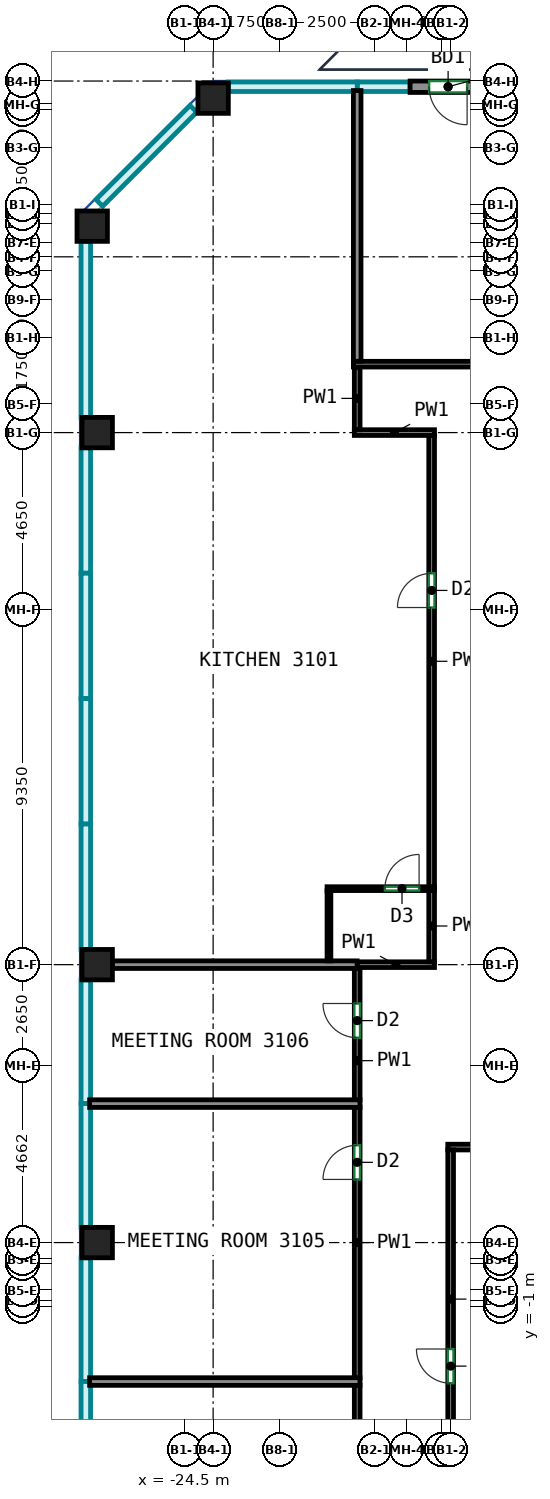
"""IFC4 building model, lengths in metres.
Left out: names, types, materials, properties, quantities, classifications, styles, units other than length and angle.
Written with IfcOpenShell. Run it as: python <this file> out.ifc"""

import sys

from ifc_helpers import new_model, si_unit, direction, frame, frame_2d, origin, origin_2d, place, context, subcontext, project, spatial, rectangle, extrude, source, transform, mapped, element, fill, save


model = new_model("IFC4")
c1 = context("Model", 3, precision=1e-05, world=origin(), true_north=direction((0.0, 1.0)))
c2 = subcontext(c1, "Body", "Model", "MODEL_VIEW")
j1 = project(units=[si_unit("LENGTHUNIT", "METRE"), si_unit("PLANEANGLEUNIT", "RADIAN")], contexts=[c1])
p1 = place(None, origin())
s1 = spatial("IfcSite", under=j1, at=p1, CompositionType="ELEMENT")
p2 = place(p1, origin())
s2 = spatial("IfcBuilding", under=s1, at=p2, CompositionType="ELEMENT")
p3 = place(p2, frame((0.0, 0.0, 138.5)))
s3 = spatial("IfcBuildingStorey", under=s2, at=p3, CompositionType="ELEMENT", Elevation=138.5)
m1 = source(origin(), c2, "Body", "SweptSolid", [
    extrude(rectangle(XDim=0.8, YDim=0.8, at=origin_2d()), origin(), (0.0, 0.0, 1.0), 5.12),
])
for number, where, z_axis, x_axis in (
    (1, (-26.932, 27.432, 0.0), (0.0, 0.0, 1.0), (1.0, 0.0, 0.0)),
    (2, (-26.8, 0.688, 0.0), (0.0, 0.0, 1.0), (1.0, 0.0, 0.0)),
    (3, (-26.8, 8.0, 0.0), (0.0, 0.0, 1.0), (1.0, 0.0, 0.0)),
    (4, (-26.8, 22.0, 0.0), (0.0, 0.0, 1.0), (1.0, 0.0, 0.0)),
    (5, (-23.75, 30.8, 0.0), (0.0, 0.0, 1.0), (1.0, 0.0, 0.0)),
):
    element("IfcColumn", number, at=place(p3, frame(where, z_axis=z_axis, x_axis=x_axis)), inside=s3, PredefinedType="COLUMN", context=c2, shape_type="MappedRepresentation", body=[
        mapped(m1, transform((0.0, 0.0, 0.0))),
    ])
m2 = source(origin(), c2, "Body", "SweptSolid", [
    extrude(rectangle(XDim=2.0, YDim=0.3, at=frame_2d((1.0, 0.0))), origin(), (0.0, 0.0, 1.0), 5.12),
])
p4 = place(p3, frame((-16.567, 31.1, 0.0), z_axis=(0.0, 0.0, 1.0), x_axis=(-1.0, 0.0, 0.0)))
e6 = element("IfcWall", 6, at=p4, inside=s3, PredefinedType="SOLIDWALL", context=c2, shape_type="MappedRepresentation", body=[
    mapped(m2, transform((0.0, 0.0, 0.0))),
])
p5 = place(p4, frame((0.5, 0.0, 0.0)))
e7 = element("IfcOpeningElement", 7, at=p5, cuts=e6, PredefinedType="OPENING", context=c2, shape_type="SweptSolid", body=[
    extrude(rectangle(XDim=1.0, YDim=2.1, at=frame_2d((0.5, 1.05))), frame((0.0, 0.16, 0.0), z_axis=(0.0, -1.0, 0.0), x_axis=(1.0, 0.0, 0.0)), (0.0, 0.0, 1.0), 0.32),
])
p6 = place(p3, frame((-19.959, -6.535, 0.0), z_axis=(0.0, 0.0, 1.0), x_axis=(0.0, 1.0, 0.0)))
e8 = element("IfcWall", 8, at=p6, inside=s3, PredefinedType="PARTITIONING", context=c2, shape_type="SweptSolid", body=[
    extrude(rectangle(XDim=3.476, YDim=0.15, at=frame_2d((1.738, 0.0))), origin(), (0.0, 0.0, 1.0), 5.12),
])
p7 = place(p6, frame((1.133, 0.0, 0.0)))
e9 = element("IfcOpeningElement", 9, at=p7, cuts=e8, PredefinedType="OPENING", context=c2, shape_type="SweptSolid", body=[
    extrude(rectangle(XDim=0.9, YDim=2.1, at=frame_2d((0.45, 1.05))), frame((0.0, 0.085, 0.0), z_axis=(0.0, -1.0, 0.0), x_axis=(1.0, 0.0, 0.0)), (0.0, 0.0, 1.0), 0.17),
])
p8 = place(p3, frame((-19.959, -2.879, 0.0), z_axis=(0.0, 0.0, 1.0), x_axis=(0.0, 1.0, 0.0)))
e10 = element("IfcWall", 10, at=p8, inside=s3, PredefinedType="PARTITIONING", context=c2, shape_type="SweptSolid", body=[
    extrude(rectangle(XDim=7.133, YDim=0.15, at=frame_2d((3.566, 0.0))), origin(), (0.0, 0.0, 1.0), 5.12),
])
p9 = place(p8, frame((5.228, 0.0, 0.0)))
e11 = element("IfcOpeningElement", 11, at=p9, cuts=e10, PredefinedType="OPENING", context=c2, shape_type="SweptSolid", body=[
    extrude(rectangle(XDim=0.9, YDim=2.1, at=frame_2d((0.45, 1.05))), frame((0.0, 0.085, 0.0), z_axis=(0.0, -1.0, 0.0), x_axis=(1.0, 0.0, 0.0)), (0.0, 0.0, 1.0), 0.17),
])
p10 = place(p3, frame((-19.959, 4.434, 0.0), z_axis=(0.0, 0.0, 1.0), x_axis=(0.0, 1.0, 0.0)))
e12 = element("IfcWall", 12, at=p10, inside=s3, PredefinedType="PARTITIONING", context=c2, shape_type="SweptSolid", body=[
    extrude(rectangle(XDim=3.466, YDim=0.15, at=frame_2d((1.733, 0.0))), origin(), (0.0, 0.0, 1.0), 5.12),
])
p11 = place(p10, frame((1.644, 0.0, 0.0)))
e13 = element("IfcOpeningElement", 13, at=p11, cuts=e12, PredefinedType="OPENING", context=c2, shape_type="SweptSolid", body=[
    extrude(rectangle(XDim=0.9, YDim=2.1, at=frame_2d((0.45, 1.05))), frame((0.0, 0.085, 0.0), z_axis=(0.0, -1.0, 0.0), x_axis=(1.0, 0.0, 0.0)), (0.0, 0.0, 1.0), 0.17),
])
p12 = place(p3, frame((-18.0, 10.04, 0.0), z_axis=(0.0, 0.0, 1.0), x_axis=(0.0, 1.0, 0.0)))
e14 = element("IfcWall", 14, at=p12, inside=s3, PredefinedType="PARTITIONING", context=c2, shape_type="SweptSolid", body=[
    extrude(rectangle(XDim=11.885, YDim=0.15, at=frame_2d((5.942, 0.0))), origin(), (0.0, 0.0, 1.0), 5.12),
])
p13 = place(p12, frame((7.357, 0.0, 0.0)))
e15 = element("IfcOpeningElement", 15, at=p13, cuts=e14, PredefinedType="OPENING", context=c2, shape_type="SweptSolid", body=[
    extrude(rectangle(XDim=0.9, YDim=2.1, at=frame_2d((0.45, 1.05))), frame((0.0, 0.085, 0.0), z_axis=(0.0, -1.0, 0.0), x_axis=(1.0, 0.0, 0.0)), (0.0, 0.0, 1.0), 0.17),
])
p14 = place(p3, frame((-20.034, 22.0, 0.0), z_axis=(0.0, 0.0, 1.0), x_axis=(1.0, 0.0, 0.0)))
e16 = element("IfcWall", 16, at=p14, inside=s3, PredefinedType="PARTITIONING", context=c2, shape_type="SweptSolid", body=[
    extrude(rectangle(XDim=2.109, YDim=0.15, at=frame_2d((1.054, 0.0))), origin(), (0.0, 0.0, 1.0), 5.12),
])
p15 = place(p3, frame((-19.959, 22.075, 0.0), z_axis=(0.0, 0.0, 1.0), x_axis=(0.0, 1.0, 0.0)))
e17 = element("IfcWall", 17, at=p15, inside=s3, PredefinedType="PARTITIONING", context=c2, shape_type="SweptSolid", body=[
    extrude(rectangle(XDim=1.65, YDim=0.15, at=frame_2d((0.825, 0.0))), origin(), (0.0, 0.0, 1.0), 5.12),
])
p16 = place(p3, frame((-17.925, 8.0, 0.0), z_axis=(0.0, 0.0, 1.0), x_axis=(-1.0, 0.0, 0.0)))
e18 = element("IfcWall", 18, at=p16, inside=s3, PredefinedType="PARTITIONING", context=c2, shape_type="SweptSolid", body=[
    extrude(rectangle(XDim=2.034, YDim=0.15, at=frame_2d((1.017, 0.0))), origin(), (0.0, 0.0, 1.0), 5.12),
])
p17 = place(p3, frame((-18.0, 8.075, 0.0), z_axis=(0.0, 0.0, 1.0), x_axis=(0.0, 1.0, 0.0)))
e19 = element("IfcWall", 19, at=p17, inside=s3, PredefinedType="PARTITIONING", context=c2, shape_type="SweptSolid", body=[
    extrude(rectangle(XDim=1.885, YDim=0.15, at=frame_2d((0.942, 0.0))), origin(), (0.0, 0.0, 1.0), 5.12),
])
p18 = place(p3, frame((-20.059, 23.8, 0.0), z_axis=(0.0, 0.0, 1.0), x_axis=(1.0, 0.0, 0.0)))
e20 = element("IfcWall", 20, at=p18, inside=s3, PredefinedType="PARTITIONING", context=c2, shape_type="SweptSolid", body=[
    extrude(rectangle(XDim=41.909, YDim=0.15, at=frame_2d((20.955, 0.0))), origin(), (0.0, 0.0, 1.0), 5.12),
])
p19 = place(p18, frame((6.453, 0.0, 0.0)))
e21 = element("IfcOpeningElement", 21, at=p19, cuts=e20, PredefinedType="OPENING", context=c2, shape_type="SweptSolid", body=[
    extrude(rectangle(XDim=0.9, YDim=2.1, at=frame_2d((0.45, 1.05))), frame((0.0, 0.085, 0.0), z_axis=(0.0, -1.0, 0.0), x_axis=(1.0, 0.0, 0.0)), (0.0, 0.0, 1.0), 0.17),
])
p20 = place(p18, frame((14.383, 0.0, 0.0)))
e22 = element("IfcOpeningElement", 22, at=p20, cuts=e20, PredefinedType="OPENING", context=c2, shape_type="SweptSolid", body=[
    extrude(rectangle(XDim=0.9, YDim=2.1, at=frame_2d((0.45, 1.05))), frame((0.0, 0.085, 0.0), z_axis=(0.0, -1.0, 0.0), x_axis=(1.0, 0.0, 0.0)), (0.0, 0.0, 1.0), 0.17),
])
p21 = place(p18, frame((34.202, 0.0, 0.0)))
e23 = element("IfcOpeningElement", 23, at=p21, cuts=e20, PredefinedType="OPENING", context=c2, shape_type="SweptSolid", body=[
    extrude(rectangle(XDim=0.9, YDim=2.1, at=frame_2d((0.45, 1.05))), frame((0.0, 0.085, 0.0), z_axis=(0.0, -1.0, 0.0), x_axis=(1.0, 0.0, 0.0)), (0.0, 0.0, 1.0), 0.17),
])
p22 = place(p18, frame((40.409, 0.0, 0.0)))
e24 = element("IfcOpeningElement", 24, at=p22, cuts=e20, PredefinedType="OPENING", context=c2, shape_type="SweptSolid", body=[
    extrude(rectangle(XDim=0.9, YDim=2.1, at=frame_2d((0.45, 1.05))), frame((0.0, 0.085, 0.0), z_axis=(0.0, -1.0, 0.0), x_axis=(1.0, 0.0, 0.0)), (0.0, 0.0, 1.0), 0.17),
])
p23 = place(p3, frame((-17.575, 3.2, 0.0), z_axis=(0.0, 0.0, 1.0), x_axis=(1.0, 0.0, 0.0)))
e25 = element("IfcWall", 25, at=p23, inside=s3, PredefinedType="PARTITIONING", context=c2, shape_type="SweptSolid", body=[
    extrude(rectangle(XDim=3.85, YDim=0.15, at=frame_2d((1.925, 0.0))), origin(), (0.0, 0.0, 1.0), 5.12),
])
p24 = place(p3, frame((-17.5, -4.725, 0.0), z_axis=(0.0, 0.0, 1.0), x_axis=(0.0, 1.0, 0.0)))
e26 = element("IfcWall", 26, at=p24, inside=s3, PredefinedType="PARTITIONING", context=c2, shape_type="SweptSolid", body=[
    extrude(rectangle(XDim=7.85, YDim=0.15, at=frame_2d((3.925, 0.0))), origin(), (0.0, 0.0, 1.0), 5.12),
])
p25 = place(p24, frame((1.712, 0.0, 0.0)))
e27 = element("IfcOpeningElement", 27, at=p25, cuts=e26, PredefinedType="OPENING", context=c2, shape_type="SweptSolid", body=[
    extrude(rectangle(XDim=0.9, YDim=2.1, at=frame_2d((0.45, 1.05))), frame((0.0, 0.085, 0.0), z_axis=(0.0, -1.0, 0.0), x_axis=(1.0, 0.0, 0.0)), (0.0, 0.0, 1.0), 0.17),
])
for number, where, z_axis, x_axis in (
    (28, (-27.0, -2.969, 0.0), (0.0, 0.0, 1.0), (1.0, 0.0, 0.0)),
    (29, (-27.0, 4.344, 0.0), (0.0, 0.0, 1.0), (1.0, 0.0, 0.0)),
):
    element("IfcWall", number, at=place(p3, frame(where, z_axis=z_axis, x_axis=x_axis)), inside=s3, PredefinedType="PARTITIONING", context=c2, shape_type="SweptSolid", body=[
        extrude(rectangle(XDim=7.114, YDim=0.2, at=frame_2d((3.557, 0.0))), origin(), (0.0, 0.0, 1.0), 5.12),
    ])
p26 = place(p3, frame((-26.4, 8.0, 0.0), z_axis=(0.0, 0.0, 1.0), x_axis=(1.0, 0.0, 0.0)))
e30 = element("IfcWall", 30, at=p26, inside=s3, PredefinedType="PARTITIONING", context=c2, shape_type="SweptSolid", body=[
    extrude(rectangle(XDim=6.439, YDim=0.2, at=frame_2d((3.219, 0.0))), origin(), (0.0, 0.0, 1.0), 5.12),
])
p27 = place(p3, frame((-20.752, 10.0, 0.0), z_axis=(0.0, 0.0, 1.0), x_axis=(1.0, 0.0, 0.0)))
e31 = element("IfcWall", 31, at=p27, inside=s3, PredefinedType="PARTITIONING", context=c2, shape_type="SweptSolid", body=[
    extrude(rectangle(XDim=2.825, YDim=0.1, at=frame_2d((1.413, 0.0))), origin(), (0.0, 0.0, 1.0), 5.12),
])
p28 = place(p27, frame((1.522, 0.0, 0.0)))
e32 = element("IfcOpeningElement", 32, at=p28, cuts=e31, PredefinedType="OPENING", context=c2, shape_type="SweptSolid", body=[
    extrude(rectangle(XDim=0.9, YDim=2.1, at=frame_2d((0.45, 1.05))), frame((0.0, 0.06, 0.0), z_axis=(0.0, -1.0, 0.0), x_axis=(1.0, 0.0, 0.0)), (0.0, 0.0, 1.0), 0.12),
])
p29 = place(p3, frame((-20.702, 8.1, 0.0), z_axis=(0.0, 0.0, 1.0), x_axis=(0.0, 1.0, 0.0)))
e33 = element("IfcWall", 33, at=p29, inside=s3, PredefinedType="PARTITIONING", context=c2, shape_type="SweptSolid", body=[
    extrude(rectangle(XDim=1.85, YDim=0.1, at=frame_2d((0.925, 0.0))), origin(), (0.0, 0.0, 1.0), 5.12),
])
p30 = place(p3, frame((-19.959, 23.877, 0.0), z_axis=(0.0, 0.0, 1.0), x_axis=(0.0, 1.0, 0.0)))
e34 = element("IfcWall", 34, at=p30, inside=s3, PredefinedType="PARTITIONING", context=c2, shape_type="SweptSolid", body=[
    extrude(rectangle(XDim=7.123, YDim=0.2, at=frame_2d((3.562, 0.0))), origin(), (0.0, 0.0, 1.0), 5.12),
])
p31 = place(p5, origin())
e35 = element("IfcDoor", 35, at=p31, inside=s3, OperationType="SINGLE_SWING_LEFT", PredefinedType="DOOR", context=c2, shape_type="SweptSolid", body=[
    extrude(rectangle(XDim=1.0, YDim=2.1, at=frame_2d((0.5, 1.05))), frame((0.0, 0.025, 0.0), z_axis=(0.0, -1.0, 0.0), x_axis=(1.0, 0.0, 0.0)), (0.0, 0.0, 1.0), 0.05),
])
fill(e7, e35)
p32 = place(p25, origin())
e36 = element("IfcDoor", 36, at=p32, inside=s3, OperationType="SINGLE_SWING_RIGHT", PredefinedType="DOOR", context=c2, shape_type="SweptSolid", body=[
    extrude(rectangle(XDim=0.9, YDim=2.1, at=frame_2d((0.45, 1.05))), frame((0.0, 0.025, 0.0), z_axis=(0.0, -1.0, 0.0), x_axis=(1.0, 0.0, 0.0)), (0.0, 0.0, 1.0), 0.05),
])
fill(e27, e36)
p33 = place(p9, origin())
e37 = element("IfcDoor", 37, at=p33, inside=s3, OperationType="SINGLE_SWING_LEFT", PredefinedType="DOOR", context=c2, shape_type="SweptSolid", body=[
    extrude(rectangle(XDim=0.9, YDim=2.1, at=frame_2d((0.45, 1.05))), frame((0.0, 0.025, 0.0), z_axis=(0.0, -1.0, 0.0), x_axis=(1.0, 0.0, 0.0)), (0.0, 0.0, 1.0), 0.05),
])
fill(e11, e37)
p34 = place(p11, origin())
e38 = element("IfcDoor", 38, at=p34, inside=s3, OperationType="SINGLE_SWING_RIGHT", PredefinedType="DOOR", context=c2, shape_type="SweptSolid", body=[
    extrude(rectangle(XDim=0.9, YDim=2.1, at=frame_2d((0.45, 1.05))), frame((0.0, 0.025, 0.0), z_axis=(0.0, -1.0, 0.0), x_axis=(1.0, 0.0, 0.0)), (0.0, 0.0, 1.0), 0.05),
])
fill(e13, e38)
p35 = place(p28, origin())
e39 = element("IfcDoor", 39, at=p35, inside=s3, OperationType="SINGLE_SWING_RIGHT", PredefinedType="DOOR", context=c2, shape_type="SweptSolid", body=[
    extrude(rectangle(XDim=0.9, YDim=2.1, at=frame_2d((0.45, 1.05))), frame((0.0, 0.025, 0.0), z_axis=(0.0, -1.0, 0.0), x_axis=(1.0, 0.0, 0.0)), (0.0, 0.0, 1.0), 0.05),
])
fill(e32, e39)
p36 = place(p13, origin())
e40 = element("IfcDoor", 40, at=p36, inside=s3, OperationType="SINGLE_SWING_LEFT", PredefinedType="DOOR", context=c2, shape_type="SweptSolid", body=[
    extrude(rectangle(XDim=0.9, YDim=2.1, at=frame_2d((0.45, 1.05))), frame((0.0, 0.025, 0.0), z_axis=(0.0, -1.0, 0.0), x_axis=(1.0, 0.0, 0.0)), (0.0, 0.0, 1.0), 0.05),
])
fill(e15, e40)
save(model, sys.argv[1])
